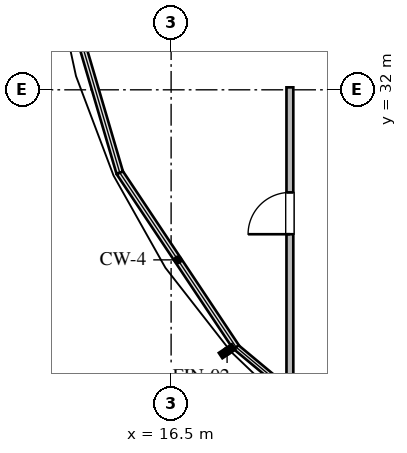
"""IFC4 building model, lengths in metres.
Left out: names, types, materials, properties, quantities, classifications, styles, units other than length and angle.
Written with IfcOpenShell. Run it as: python <this file> out.ifc"""

import sys

from ifc_helpers import new_model, si_unit, direction, frame, frame_2d, origin, place, context, subcontext, project, spatial, rectangle, extrude, element, fill, save


model = new_model("IFC4")
c1 = context("Model", 3, precision=1e-05, world=origin(), true_north=direction((0.0, 1.0)))
c2 = subcontext(c1, "Body", "Model", "MODEL_VIEW")
j1 = project(units=[si_unit("LENGTHUNIT", "METRE"), si_unit("PLANEANGLEUNIT", "RADIAN")], contexts=[c1])
p1 = place(None, origin())
s1 = spatial("IfcSite", under=j1, at=p1, CompositionType="ELEMENT")
p2 = place(p1, origin())
s2 = spatial("IfcBuilding", under=s1, at=p2, CompositionType="ELEMENT")
p3 = place(p2, frame((0.0, 0.0, 242.4)))
s3 = spatial("IfcBuildingStorey", under=s2, at=p3, CompositionType="ELEMENT", Elevation=242.4)
p4 = place(p3, frame((19.625, 24.06, 0.0), z_axis=(0.0, 0.0, 1.0), x_axis=(0.0, 1.0, 0.0)))
e1 = element("IfcWall", 1, at=p4, inside=s3, PredefinedType="PARTITIONING", context=c2, shape_type="SweptSolid", body=[
    extrude(rectangle(XDim=8.005, YDim=0.18, at=frame_2d((4.002, 0.0))), origin(), (0.0, 0.0, 1.0), 2.817),
])
p5 = place(p4, frame((4.14, 0.0, 0.0)))
e2 = element("IfcOpeningElement", 2, at=p5, cuts=e1, PredefinedType="OPENING", context=c2, shape_type="SweptSolid", body=[
    extrude(rectangle(XDim=1.1, YDim=2.1, at=frame_2d((0.55, 1.05))), frame((0.0, 0.1, 0.0), z_axis=(0.0, -1.0, 0.0), x_axis=(1.0, 0.0, 0.0)), (0.0, 0.0, 1.0), 0.2),
])
p6 = place(p5, origin())
e3 = element("IfcDoor", 3, at=p6, inside=s3, OperationType="SINGLE_SWING_LEFT", PredefinedType="DOOR", context=c2, shape_type="SweptSolid", body=[
    extrude(rectangle(XDim=1.1, YDim=2.1, at=frame_2d((0.55, 1.05))), frame((0.0, 0.025, 0.0), z_axis=(0.0, -1.0, 0.0), x_axis=(1.0, 0.0, 0.0)), (0.0, 0.0, 1.0), 0.05),
])
fill(e2, e3)
save(model, sys.argv[1])
